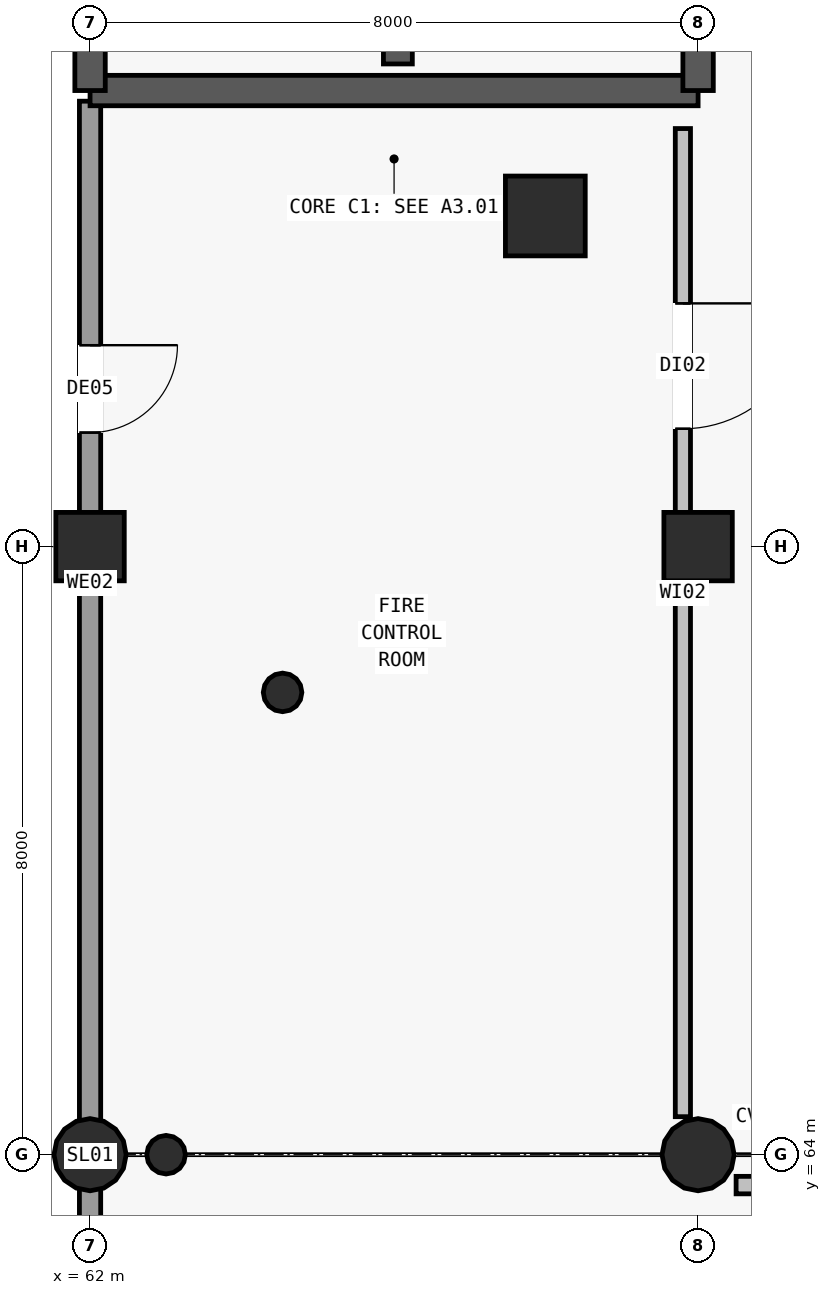
"""IFC4 building model, lengths in metres.
Left out: names, types, materials, properties, quantities, classifications, styles, units other than length and angle.
Written with IfcOpenShell. Run it as: python <this file> out.ifc"""

import sys

from ifc_helpers import new_model, si_unit, direction, frame, frame_2d, origin, origin_2d, place, context, subcontext, project, spatial, rectangle, circle, hollow_circle, extrude, element, fill, save


model = new_model("IFC4")
c1 = context("Model", 3, precision=1e-05, world=origin(), true_north=direction((0.0, 1.0)))
c2 = subcontext(c1, "Body", "Model", "MODEL_VIEW")
j1 = project(units=[si_unit("LENGTHUNIT", "METRE"), si_unit("PLANEANGLEUNIT", "RADIAN")], contexts=[c1])
p1 = place(None, origin())
s1 = spatial("IfcSite", under=j1, at=p1, CompositionType="ELEMENT")
p2 = place(p1, origin())
s2 = spatial("IfcBuilding", under=s1, at=p2, CompositionType="ELEMENT")
p3 = place(p2, origin())
s3 = spatial("IfcBuildingStorey", under=s2, at=p3, CompositionType="ELEMENT", Elevation=0.0)
p4 = place(p3, frame((67.99, 76.35, -0.9), z_axis=(0.0, 0.0, 1.0), x_axis=(1.0, 0.0, 0.0)))
e1 = element("IfcColumn", 1, at=p4, inside=s3, PredefinedType="COLUMN", context=c2, shape_type="SweptSolid", body=[
    extrude(rectangle(XDim=1.05, YDim=1.05, at=origin_2d()), origin(), (0.0, 0.0, 1.0), 6.5),
])
for number, where, z_axis, x_axis in (
    (2, (64.533, 70.082, -0.9), (0.0, 0.0, 1.0), (1.0, 0.0, 0.0)),
    (3, (63.0, 64.0, -0.9), (0.0, 0.0, 1.0), (1.0, 0.0, 0.0)),
):
    element("IfcColumn", number, at=place(p3, frame(where, z_axis=z_axis, x_axis=x_axis)), inside=s3, PredefinedType="COLUMN", context=c2, shape_type="SweptSolid", body=[
        extrude(hollow_circle(Radius=0.254, WallThickness=0.016, at=origin_2d()), origin(), (0.0, 0.0, 1.0), 6.5),
    ])
p5 = place(p3, frame((62.0, 64.0, -0.9), z_axis=(0.0, 0.0, 1.0), x_axis=(1.0, 0.0, 0.0)))
e4 = element("IfcColumn", 4, at=p5, inside=s3, PredefinedType="COLUMN", context=c2, shape_type="SweptSolid", body=[
    extrude(circle(Radius=0.475, at=origin_2d()), origin(), (0.0, 0.0, 1.0), 6.5),
])
p6 = place(p3, frame((62.0, 72.0, -0.9), z_axis=(0.0, 0.0, 1.0), x_axis=(1.0, 0.0, 0.0)))
e5 = element("IfcColumn", 5, at=p6, inside=s3, PredefinedType="COLUMN", context=c2, shape_type="SweptSolid", body=[
    extrude(rectangle(XDim=0.9, YDim=0.9, at=origin_2d()), origin(), (0.0, 0.0, 1.0), 6.5),
])
p7 = place(p3, frame((70.0, 64.0, -0.9), z_axis=(0.0, 0.0, 1.0), x_axis=(1.0, 0.0, 0.0)))
e6 = element("IfcColumn", 6, at=p7, inside=s3, PredefinedType="COLUMN", context=c2, shape_type="SweptSolid", body=[
    extrude(circle(Radius=0.475, at=origin_2d()), origin(), (0.0, 0.0, 1.0), 6.5),
])
p8 = place(p3, frame((70.0, 72.0, -0.9), z_axis=(0.0, 0.0, 1.0), x_axis=(1.0, 0.0, 0.0)))
e7 = element("IfcColumn", 7, at=p8, inside=s3, PredefinedType="COLUMN", context=c2, shape_type="SweptSolid", body=[
    extrude(rectangle(XDim=0.9, YDim=0.9, at=origin_2d()), origin(), (0.0, 0.0, 1.0), 6.5),
])
p9 = place(p3, frame((62.0, 63.575, 0.0), z_axis=(0.0, 0.0, 1.0), x_axis=(0.0, -1.0, 0.0)))
e8 = element("IfcWall", 8, at=p9, inside=s3, PredefinedType="STANDARD", context=c2, shape_type="SweptSolid", body=[
    extrude(rectangle(XDim=7.125, YDim=0.28, at=frame_2d((3.562, 0.0))), origin(), (0.0, 0.0, 1.0), 4.2),
])
p10 = place(p3, frame((62.0, 77.86, 0.0), z_axis=(0.0, 0.0, 1.0), x_axis=(0.0, -1.0, 0.0)))
e9 = element("IfcWall", 9, at=p10, inside=s3, PredefinedType="STANDARD", context=c2, shape_type="SweptSolid", body=[
    extrude(rectangle(XDim=13.435, YDim=0.28, at=frame_2d((6.718, 0.0))), origin(), (0.0, 0.0, 1.0), 4.2),
])
p11 = place(p10, frame((3.21, 0.0, 0.0)))
e10 = element("IfcOpeningElement", 10, at=p11, cuts=e9, PredefinedType="OPENING", context=c2, shape_type="SweptSolid", body=[
    extrude(rectangle(XDim=1.15, YDim=2.2, at=frame_2d((0.575, 1.1))), frame((0.0, 0.15, 0.0), z_axis=(0.0, -1.0, 0.0), x_axis=(1.0, 0.0, 0.0)), (0.0, 0.0, 1.0), 0.3),
])
p12 = place(p3, frame((62.0, 78.0, -0.9), z_axis=(0.0, 0.0, 1.0), x_axis=(1.0, 0.0, 0.0)))
e11 = element("IfcWall", 11, at=p12, inside=s3, PredefinedType="SHEAR", context=c2, shape_type="SweptSolid", body=[
    extrude(rectangle(XDim=8.0, YDim=0.4, at=frame_2d((4.0, 0.0))), origin(), (0.0, 0.0, 1.0), 6.22),
])
p13 = place(p3, frame((70.0, 78.0, -0.9), z_axis=(0.0, 0.0, 1.0), x_axis=(0.0, 1.0, 0.0)))
e12 = element("IfcWall", 12, at=p13, inside=s3, PredefinedType="SHEAR", context=c2, shape_type="SweptSolid", body=[
    extrude(rectangle(XDim=10.0, YDim=0.4, at=frame_2d((5.0, 0.0))), origin(), (0.0, 0.0, 1.0), 6.22),
])
p14 = place(p13, frame((1.4, 0.0, 0.9)))
e13 = element("IfcOpeningElement", 13, at=p14, cuts=e12, PredefinedType="OPENING", context=c2, shape_type="SweptSolid", body=[
    extrude(rectangle(XDim=1.9, YDim=2.3, at=frame_2d((0.95, 1.15))), frame((0.0, 0.21, 0.0), z_axis=(0.0, -1.0, 0.0), x_axis=(1.0, 0.0, 0.0)), (0.0, 0.0, 1.0), 0.42),
])
p15 = place(p3, frame((62.0, 88.0, -0.9), z_axis=(0.0, 0.0, 1.0), x_axis=(0.0, -1.0, 0.0)))
e14 = element("IfcWall", 14, at=p15, inside=s3, PredefinedType="SHEAR", context=c2, shape_type="SweptSolid", body=[
    extrude(rectangle(XDim=10.0, YDim=0.4, at=frame_2d((5.0, 0.0))), origin(), (0.0, 0.0, 1.0), 6.22),
])
p16 = place(p3, frame((66.05, 78.35, -0.9), z_axis=(0.0, 0.0, 1.0), x_axis=(0.0, 1.0, 0.0)))
e15 = element("IfcWall", 15, at=p16, inside=s3, PredefinedType="SHEAR", context=c2, shape_type="SweptSolid", body=[
    extrude(rectangle(XDim=9.3, YDim=0.38, at=frame_2d((4.65, 0.0))), origin(), (0.0, 0.0, 1.0), 6.22),
])
p17 = place(p16, frame((0.18, 0.0, 0.9)))
e16 = element("IfcOpeningElement", 16, at=p17, cuts=e15, PredefinedType="OPENING", context=c2, shape_type="SweptSolid", body=[
    extrude(rectangle(XDim=1.65, YDim=2.2, at=frame_2d((0.825, 1.1))), frame((0.0, 0.2, 0.0), z_axis=(0.0, -1.0, 0.0), x_axis=(1.0, 0.0, 0.0)), (0.0, 0.0, 1.0), 0.4),
])
p18 = place(p3, frame((70.5, 63.6, 0.0), z_axis=(0.0, 0.0, 1.0), x_axis=(1.0, 0.0, 0.0)))
e17 = element("IfcWall", 17, at=p18, inside=s3, PredefinedType="PARTITIONING", context=c2, shape_type="SweptSolid", body=[
    extrude(rectangle(XDim=49.0, YDim=0.23, at=frame_2d((24.5, 0.0))), origin(), (0.0, 0.0, 1.0), 4.2),
])
p19 = place(p18, frame((11.0, 0.0, 0.0)))
e18 = element("IfcOpeningElement", 18, at=p19, cuts=e17, PredefinedType="OPENING", context=c2, shape_type="SweptSolid", body=[
    extrude(rectangle(XDim=1.55, YDim=2.2, at=frame_2d((0.775, 1.1))), frame((0.0, 0.125, 0.0), z_axis=(0.0, -1.0, 0.0), x_axis=(1.0, 0.0, 0.0)), (0.0, 0.0, 1.0), 0.25),
])
p20 = place(p18, frame((29.0, 0.0, 0.0)))
e19 = element("IfcOpeningElement", 19, at=p20, cuts=e17, PredefinedType="OPENING", context=c2, shape_type="SweptSolid", body=[
    extrude(rectangle(XDim=1.85, YDim=2.25, at=frame_2d((0.925, 1.125))), frame((0.0, 0.125, 0.0), z_axis=(0.0, -1.0, 0.0), x_axis=(1.0, 0.0, 0.0)), (0.0, 0.0, 1.0), 0.25),
])
p21 = place(p18, frame((41.0, 0.0, 0.0)))
e20 = element("IfcOpeningElement", 20, at=p21, cuts=e17, PredefinedType="OPENING", context=c2, shape_type="SweptSolid", body=[
    extrude(rectangle(XDim=1.55, YDim=2.2, at=frame_2d((0.775, 1.1))), frame((0.0, 0.125, 0.0), z_axis=(0.0, -1.0, 0.0), x_axis=(1.0, 0.0, 0.0)), (0.0, 0.0, 1.0), 0.25),
])
p22 = place(p3, frame((69.8, 77.5, 0.0), z_axis=(0.0, 0.0, 1.0), x_axis=(0.0, -1.0, 0.0)))
e21 = element("IfcWall", 21, at=p22, inside=s3, PredefinedType="PARTITIONING", context=c2, shape_type="SweptSolid", body=[
    extrude(rectangle(XDim=13.0, YDim=0.2, at=frame_2d((6.5, 0.0))), origin(), (0.0, 0.0, 1.0), 4.2),
])
p23 = place(p22, frame((2.3, 0.0, 0.0)))
e22 = element("IfcOpeningElement", 22, at=p23, cuts=e21, PredefinedType="OPENING", context=c2, shape_type="SweptSolid", body=[
    extrude(rectangle(XDim=1.65, YDim=2.2, at=frame_2d((0.825, 1.1))), frame((0.0, 0.11, 0.0), z_axis=(0.0, -1.0, 0.0), x_axis=(1.0, 0.0, 0.0)), (0.0, 0.0, 1.0), 0.22),
])
p24 = place(p11, origin())
e23 = element("IfcDoor", 23, at=p24, inside=s3, OperationType="SINGLE_SWING_LEFT", PredefinedType="DOOR", context=c2, shape_type="SweptSolid", body=[
    extrude(rectangle(XDim=1.15, YDim=2.2, at=frame_2d((0.575, 1.1))), frame((0.0, 0.025, 0.0), z_axis=(0.0, -1.0, 0.0), x_axis=(1.0, 0.0, 0.0)), (0.0, 0.0, 1.0), 0.05),
])
fill(e10, e23)
p25 = place(p23, origin())
e24 = element("IfcDoor", 24, at=p25, inside=s3, OperationType="SINGLE_SWING_LEFT", PredefinedType="DOOR", context=c2, shape_type="SweptSolid", body=[
    extrude(rectangle(XDim=1.65, YDim=2.2, at=frame_2d((0.825, 1.1))), frame((0.0, 0.025, 0.0), z_axis=(0.0, -1.0, 0.0), x_axis=(1.0, 0.0, 0.0)), (0.0, 0.0, 1.0), 0.05),
])
fill(e22, e24)
save(model, sys.argv[1])
